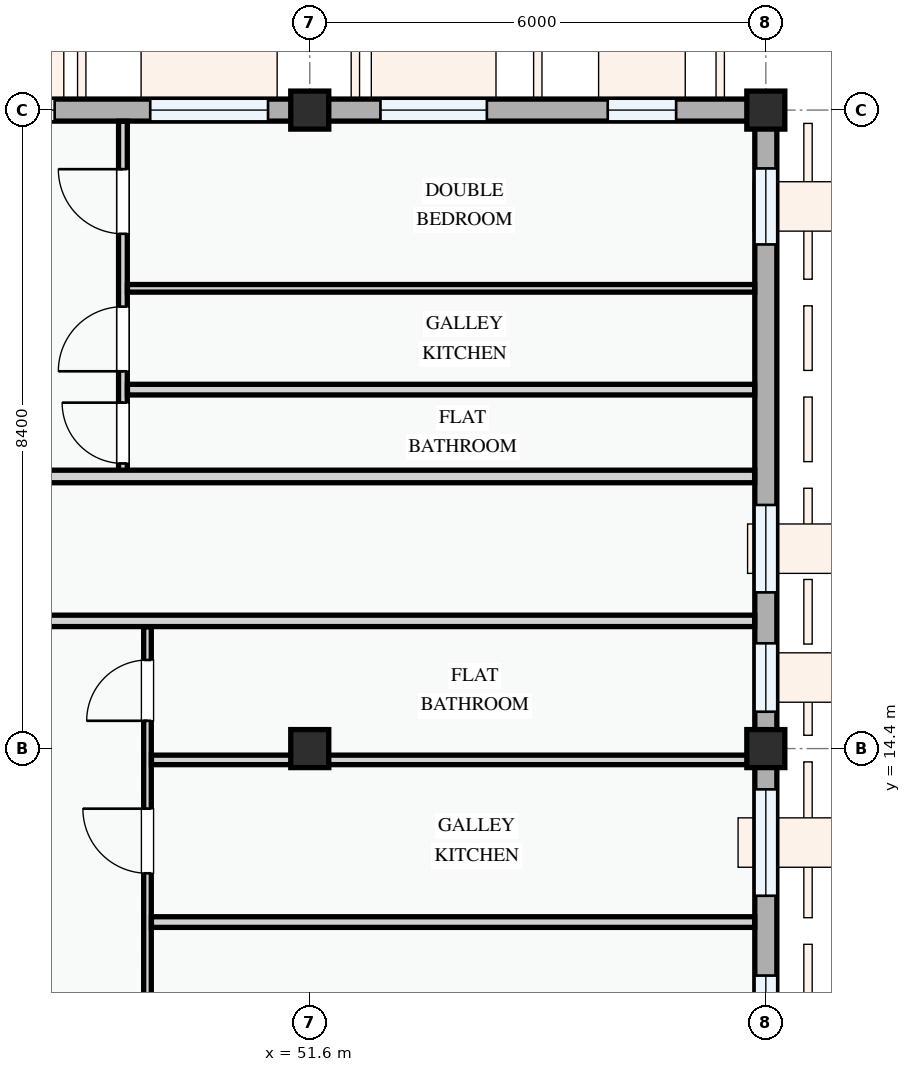
"""IFC4 building model, lengths in metres.
Left out: names, types, materials, properties, quantities, classifications, styles, units other than length and angle.
Written with IfcOpenShell. Run it as: python <this file> out.ifc"""

import sys

from ifc_helpers import new_model, si_unit, direction, frame, frame_2d, origin, origin_2d, place, context, subcontext, project, spatial, rectangle, extrude, element, fill, save


model = new_model("IFC4")
c1 = context("Model", 3, precision=1e-05, world=origin(), true_north=direction((0.0, 1.0)))
c2 = subcontext(c1, "Body", "Model", "MODEL_VIEW")
j1 = project(units=[si_unit("LENGTHUNIT", "METRE"), si_unit("PLANEANGLEUNIT", "RADIAN")], contexts=[c1])
p1 = place(None, origin())
s1 = spatial("IfcSite", under=j1, at=p1, CompositionType="ELEMENT")
p2 = place(p1, origin())
s2 = spatial("IfcBuilding", under=s1, at=p2, CompositionType="ELEMENT")
p3 = place(p2, frame((0.0, 0.0, 21.3)))
s3 = spatial("IfcBuildingStorey", under=s2, at=p3, CompositionType="ELEMENT", Elevation=21.3)
for number, where, z_axis, x_axis in (
    (1, (51.6, 14.4, 0.0), (0.0, 0.0, 1.0), (1.0, 0.0, 0.0)),
    (2, (51.6, 22.8, 0.0), (0.0, 0.0, 1.0), (1.0, 0.0, 0.0)),
    (3, (57.6, 14.4, 0.0), (0.0, 0.0, 1.0), (1.0, 0.0, 0.0)),
    (4, (57.6, 22.8, 0.0), (0.0, 0.0, 1.0), (1.0, 0.0, 0.0)),
):
    element("IfcColumn", number, at=place(p3, frame(where, z_axis=z_axis, x_axis=x_axis)), inside=s3, PredefinedType="COLUMN", context=c2, shape_type="SweptSolid", body=[
        extrude(rectangle(XDim=0.5, YDim=0.5, at=origin_2d()), origin(), (0.0, 0.0, 1.0), 3.3),
    ])
p4 = place(p3, frame((57.6, 8.4, 0.0), z_axis=(0.0, 0.0, 1.0), x_axis=(0.0, 1.0, 0.0)))
e5 = element("IfcWall", 5, at=p4, inside=s3, PredefinedType="STANDARD", context=c2, shape_type="SweptSolid", body=[
    extrude(rectangle(XDim=6.0, YDim=0.29, at=frame_2d((3.0, 0.0))), origin(), (0.0, 0.0, 1.0), 2.575),
])
p5 = place(p4, frame((0.894, 0.0, 0.78)))
e6 = element("IfcOpeningElement", 6, at=p5, cuts=e5, PredefinedType="OPENING", context=c2, shape_type="SweptSolid", body=[
    extrude(rectangle(XDim=2.12, YDim=1.44, at=frame_2d((1.06, 0.72))), frame((0.0, 0.155, 0.0), z_axis=(0.0, -1.0, 0.0), x_axis=(1.0, 0.0, 0.0)), (0.0, 0.0, 1.0), 0.31),
])
p6 = place(p4, frame((4.064, 0.0, 0.78)))
e7 = element("IfcOpeningElement", 7, at=p6, cuts=e5, PredefinedType="OPENING", context=c2, shape_type="SweptSolid", body=[
    extrude(rectangle(XDim=1.4, YDim=1.45, at=frame_2d((0.7, 0.725))), frame((0.0, 0.155, 0.0), z_axis=(0.0, -1.0, 0.0), x_axis=(1.0, 0.0, 0.0)), (0.0, 0.0, 1.0), 0.31),
])
p7 = place(p3, frame((57.6, 14.4, 0.0), z_axis=(0.0, 0.0, 1.0), x_axis=(0.0, 1.0, 0.0)))
e8 = element("IfcWall", 8, at=p7, inside=s3, PredefinedType="STANDARD", context=c2, shape_type="SweptSolid", body=[
    extrude(rectangle(XDim=8.4, YDim=0.29, at=frame_2d((4.2, 0.0))), origin(), (0.0, 0.0, 1.0), 2.425),
])
p8 = place(p7, frame((0.485, 0.0, 0.78)))
e9 = element("IfcOpeningElement", 9, at=p8, cuts=e8, PredefinedType="OPENING", context=c2, shape_type="SweptSolid", body=[
    extrude(rectangle(XDim=0.9, YDim=1.2, at=frame_2d((0.45, 0.6))), frame((0.0, 0.155, 0.0), z_axis=(0.0, -1.0, 0.0), x_axis=(1.0, 0.0, 0.0)), (0.0, 0.0, 1.0), 0.31),
])
p9 = place(p7, frame((2.055, 0.0, 0.78)))
e10 = element("IfcOpeningElement", 10, at=p9, cuts=e8, PredefinedType="OPENING", context=c2, shape_type="SweptSolid", body=[
    extrude(rectangle(XDim=1.15, YDim=1.25, at=frame_2d((0.575, 0.625))), frame((0.0, 0.155, 0.0), z_axis=(0.0, -1.0, 0.0), x_axis=(1.0, 0.0, 0.0)), (0.0, 0.0, 1.0), 0.31),
])
p10 = place(p7, frame((6.633, 0.0, 0.78)))
e11 = element("IfcOpeningElement", 11, at=p10, cuts=e8, PredefinedType="OPENING", context=c2, shape_type="SweptSolid", body=[
    extrude(rectangle(XDim=1.0, YDim=1.25, at=frame_2d((0.5, 0.625))), frame((0.0, 0.155, 0.0), z_axis=(0.0, -1.0, 0.0), x_axis=(1.0, 0.0, 0.0)), (0.0, 0.0, 1.0), 0.31),
])
p11 = place(p3, frame((57.6, 22.8, 0.0), z_axis=(0.0, 0.0, 1.0), x_axis=(-1.0, 0.0, 0.0)))
e12 = element("IfcWall", 12, at=p11, inside=s3, PredefinedType="STANDARD", context=c2, shape_type="SweptSolid", body=[
    extrude(rectangle(XDim=6.0, YDim=0.29, at=frame_2d((3.0, 0.0))), origin(), (0.0, 0.0, 1.0), 2.475),
])
p12 = place(p11, frame((1.18, 0.0, 0.78)))
e13 = element("IfcOpeningElement", 13, at=p12, cuts=e12, PredefinedType="OPENING", context=c2, shape_type="SweptSolid", body=[
    extrude(rectangle(XDim=0.9, YDim=1.2, at=frame_2d((0.45, 0.6))), frame((0.0, 0.155, 0.0), z_axis=(0.0, -1.0, 0.0), x_axis=(1.0, 0.0, 0.0)), (0.0, 0.0, 1.0), 0.31),
])
p13 = place(p11, frame((3.67, 0.0, 0.78)))
e14 = element("IfcOpeningElement", 14, at=p13, cuts=e12, PredefinedType="OPENING", context=c2, shape_type="SweptSolid", body=[
    extrude(rectangle(XDim=1.4, YDim=1.45, at=frame_2d((0.7, 0.725))), frame((0.0, 0.155, 0.0), z_axis=(0.0, -1.0, 0.0), x_axis=(1.0, 0.0, 0.0)), (0.0, 0.0, 1.0), 0.31),
])
p14 = place(p3, frame((51.6, 22.8, 0.0), z_axis=(0.0, 0.0, 1.0), x_axis=(-1.0, 0.0, 0.0)))
e15 = element("IfcWall", 15, at=p14, inside=s3, PredefinedType="STANDARD", context=c2, shape_type="SweptSolid", body=[
    extrude(rectangle(XDim=8.4, YDim=0.29, at=frame_2d((4.2, 0.0))), origin(), (0.0, 0.0, 1.0), 2.375),
])
p15 = place(p14, frame((0.549, 0.0, 0.78)))
e16 = element("IfcOpeningElement", 16, at=p15, cuts=e15, PredefinedType="OPENING", context=c2, shape_type="SweptSolid", body=[
    extrude(rectangle(XDim=1.55, YDim=1.4, at=frame_2d((0.775, 0.7))), frame((0.0, 0.155, 0.0), z_axis=(0.0, -1.0, 0.0), x_axis=(1.0, 0.0, 0.0)), (0.0, 0.0, 1.0), 0.31),
])
p16 = place(p14, frame((3.356, 0.0, 0.78)))
e17 = element("IfcOpeningElement", 17, at=p16, cuts=e15, PredefinedType="OPENING", context=c2, shape_type="SweptSolid", body=[
    extrude(rectangle(XDim=1.15, YDim=1.25, at=frame_2d((0.575, 0.625))), frame((0.0, 0.155, 0.0), z_axis=(0.0, -1.0, 0.0), x_axis=(1.0, 0.0, 0.0)), (0.0, 0.0, 1.0), 0.31),
])
p17 = place(p14, frame((5.947, 0.0, 0.78)))
e18 = element("IfcOpeningElement", 18, at=p17, cuts=e15, PredefinedType="OPENING", context=c2, shape_type="SweptSolid", body=[
    extrude(rectangle(XDim=1.58, YDim=1.48, at=frame_2d((0.79, 0.74))), frame((0.0, 0.155, 0.0), z_axis=(0.0, -1.0, 0.0), x_axis=(1.0, 0.0, 0.0)), (0.0, 0.0, 1.0), 0.31),
])
p18 = place(p3, frame((49.465, 8.547, 0.0), z_axis=(0.0, 0.0, 1.0), x_axis=(0.0, 1.0, 0.0)))
e19 = element("IfcWall", 19, at=p18, inside=s3, PredefinedType="PARTITIONING", context=c2, shape_type="SweptSolid", body=[
    extrude(rectangle(XDim=7.456, YDim=0.1, at=frame_2d((3.728, 0.0))), origin(), (0.0, 0.0, 1.0), 3.0),
])
p19 = place(p18, frame((1.317, 0.0, 0.0)))
e20 = element("IfcOpeningElement", 20, at=p19, cuts=e19, PredefinedType="OPENING", context=c2, shape_type="SweptSolid", body=[
    extrude(rectangle(XDim=0.85, YDim=2.1, at=frame_2d((0.425, 1.05))), frame((0.0, 0.06, 0.0), z_axis=(0.0, -1.0, 0.0), x_axis=(1.0, 0.0, 0.0)), (0.0, 0.0, 1.0), 0.12),
])
p20 = place(p18, frame((4.212, 0.0, 0.0)))
e21 = element("IfcOpeningElement", 21, at=p20, cuts=e19, PredefinedType="OPENING", context=c2, shape_type="SweptSolid", body=[
    extrude(rectangle(XDim=0.85, YDim=2.1, at=frame_2d((0.425, 1.05))), frame((0.0, 0.06, 0.0), z_axis=(0.0, -1.0, 0.0), x_axis=(1.0, 0.0, 0.0)), (0.0, 0.0, 1.0), 0.12),
])
p21 = place(p18, frame((6.219, 0.0, 0.0)))
e22 = element("IfcOpeningElement", 22, at=p21, cuts=e19, PredefinedType="OPENING", context=c2, shape_type="SweptSolid", body=[
    extrude(rectangle(XDim=0.8, YDim=2.1, at=frame_2d((0.4, 1.05))), frame((0.0, 0.06, 0.0), z_axis=(0.0, -1.0, 0.0), x_axis=(1.0, 0.0, 0.0)), (0.0, 0.0, 1.0), 0.12),
])
p22 = place(p3, frame((49.517, 12.118, 0.0), z_axis=(0.0, 0.0, 1.0), x_axis=(1.0, 0.0, 0.0)))
e23 = element("IfcWall", 23, at=p22, inside=s3, PredefinedType="PARTITIONING", context=c2, shape_type="SweptSolid", body=[
    extrude(rectangle(XDim=7.936, YDim=0.14, at=frame_2d((3.968, 0.0))), origin(), (0.0, 0.0, 1.0), 3.0),
])
p23 = place(p3, frame((49.517, 14.251, 0.0), z_axis=(0.0, 0.0, 1.0), x_axis=(1.0, 0.0, 0.0)))
e24 = element("IfcWall", 24, at=p23, inside=s3, PredefinedType="PARTITIONING", context=c2, shape_type="SweptSolid", body=[
    extrude(rectangle(XDim=7.936, YDim=0.125, at=frame_2d((3.968, 0.0))), origin(), (0.0, 0.0, 1.0), 2.375),
])
p24 = place(p3, frame((49.142, 17.98, 0.0), z_axis=(0.0, 0.0, 1.0), x_axis=(0.0, 1.0, 0.0)))
e25 = element("IfcWall", 25, at=p24, inside=s3, PredefinedType="PARTITIONING", context=c2, shape_type="SweptSolid", body=[
    extrude(rectangle(XDim=4.673, YDim=0.115, at=frame_2d((2.336, 0.0))), origin(), (0.0, 0.0, 1.0), 3.0),
])
p25 = place(p24, frame((0.171, 0.0, 0.0)))
e26 = element("IfcOpeningElement", 26, at=p25, cuts=e25, PredefinedType="OPENING", context=c2, shape_type="SweptSolid", body=[
    extrude(rectangle(XDim=0.8, YDim=2.1, at=frame_2d((0.4, 1.05))), frame((0.0, 0.067, 0.0), z_axis=(0.0, -1.0, 0.0), x_axis=(1.0, 0.0, 0.0)), (0.0, 0.0, 1.0), 0.135),
])
p26 = place(p24, frame((1.384, 0.0, 0.0)))
e27 = element("IfcOpeningElement", 27, at=p26, cuts=e25, PredefinedType="OPENING", context=c2, shape_type="SweptSolid", body=[
    extrude(rectangle(XDim=0.85, YDim=2.1, at=frame_2d((0.425, 1.05))), frame((0.0, 0.067, 0.0), z_axis=(0.0, -1.0, 0.0), x_axis=(1.0, 0.0, 0.0)), (0.0, 0.0, 1.0), 0.135),
])
p27 = place(p24, frame((3.193, 0.0, 0.0)))
e28 = element("IfcOpeningElement", 28, at=p27, cuts=e25, PredefinedType="OPENING", context=c2, shape_type="SweptSolid", body=[
    extrude(rectangle(XDim=0.85, YDim=2.1, at=frame_2d((0.425, 1.05))), frame((0.0, 0.067, 0.0), z_axis=(0.0, -1.0, 0.0), x_axis=(1.0, 0.0, 0.0)), (0.0, 0.0, 1.0), 0.135),
])
p28 = place(p3, frame((49.201, 20.455, 0.0), z_axis=(0.0, 0.0, 1.0), x_axis=(1.0, 0.0, 0.0)))
e29 = element("IfcWall", 29, at=p28, inside=s3, PredefinedType="PARTITIONING", context=c2, shape_type="SweptSolid", body=[
    extrude(rectangle(XDim=8.251, YDim=0.1, at=frame_2d((4.126, 0.0))), origin(), (0.0, 0.0, 1.0), 3.0),
])
p29 = place(p3, frame((49.201, 19.122, 0.0), z_axis=(0.0, 0.0, 1.0), x_axis=(1.0, 0.0, 0.0)))
e30 = element("IfcWall", 30, at=p29, inside=s3, PredefinedType="PARTITIONING", context=c2, shape_type="SweptSolid", body=[
    extrude(rectangle(XDim=8.251, YDim=0.14, at=frame_2d((4.126, 0.0))), origin(), (0.0, 0.0, 1.0), 3.0),
])
p30 = place(p3, frame((22.66, 16.08, 0.0), z_axis=(0.0, 0.0, 1.0), x_axis=(1.0, 0.0, 0.0)))
e31 = element("IfcWall", 31, at=p30, inside=s3, PredefinedType="PARTITIONING", context=c2, shape_type="SweptSolid", body=[
    extrude(rectangle(XDim=34.793, YDim=0.15, at=frame_2d((17.396, 0.0))), origin(), (0.0, 0.0, 1.0), 3.0),
])
p31 = place(p30, frame((2.627, 0.0, 0.0)))
e32 = element("IfcOpeningElement", 32, at=p31, cuts=e31, PredefinedType="OPENING", context=c2, shape_type="SweptSolid", body=[
    extrude(rectangle(XDim=0.92, YDim=2.1, at=frame_2d((0.46, 1.05))), frame((0.0, 0.085, 0.0), z_axis=(0.0, -1.0, 0.0), x_axis=(1.0, 0.0, 0.0)), (0.0, 0.0, 1.0), 0.17),
])
p32 = place(p30, frame((10.02, 0.0, 0.0)))
e33 = element("IfcOpeningElement", 33, at=p32, cuts=e31, PredefinedType="OPENING", context=c2, shape_type="SweptSolid", body=[
    extrude(rectangle(XDim=0.92, YDim=2.1, at=frame_2d((0.46, 1.05))), frame((0.0, 0.085, 0.0), z_axis=(0.0, -1.0, 0.0), x_axis=(1.0, 0.0, 0.0)), (0.0, 0.0, 1.0), 0.17),
])
p33 = place(p30, frame((24.355, 0.0, 0.0)))
e34 = element("IfcOpeningElement", 34, at=p33, cuts=e31, PredefinedType="OPENING", context=c2, shape_type="SweptSolid", body=[
    extrude(rectangle(XDim=0.92, YDim=2.1, at=frame_2d((0.46, 1.05))), frame((0.0, 0.085, 0.0), z_axis=(0.0, -1.0, 0.0), x_axis=(1.0, 0.0, 0.0)), (0.0, 0.0, 1.0), 0.17),
])
p34 = place(p3, frame((22.66, 17.98, 0.0), z_axis=(0.0, 0.0, 1.0), x_axis=(1.0, 0.0, 0.0)))
e35 = element("IfcWall", 35, at=p34, inside=s3, PredefinedType="PARTITIONING", context=c2, shape_type="SweptSolid", body=[
    extrude(rectangle(XDim=34.793, YDim=0.165, at=frame_2d((17.396, 0.0))), origin(), (0.0, 0.0, 1.0), 3.0),
])
p35 = place(p34, frame((2.63, 0.0, 0.0)))
e36 = element("IfcOpeningElement", 36, at=p35, cuts=e35, PredefinedType="OPENING", context=c2, shape_type="SweptSolid", body=[
    extrude(rectangle(XDim=0.92, YDim=2.1, at=frame_2d((0.46, 1.05))), frame((0.0, 0.093, 0.0), z_axis=(0.0, -1.0, 0.0), x_axis=(1.0, 0.0, 0.0)), (0.0, 0.0, 1.0), 0.185),
])
p36 = place(p34, frame((10.02, 0.0, 0.0)))
e37 = element("IfcOpeningElement", 37, at=p36, cuts=e35, PredefinedType="OPENING", context=c2, shape_type="SweptSolid", body=[
    extrude(rectangle(XDim=0.96, YDim=2.12, at=frame_2d((0.48, 1.06))), frame((0.0, 0.093, 0.0), z_axis=(0.0, -1.0, 0.0), x_axis=(1.0, 0.0, 0.0)), (0.0, 0.0, 1.0), 0.185),
])
p37 = place(p34, frame((24.289, 0.0, 0.0)))
e38 = element("IfcOpeningElement", 38, at=p37, cuts=e35, PredefinedType="OPENING", context=c2, shape_type="SweptSolid", body=[
    extrude(rectangle(XDim=0.92, YDim=2.1, at=frame_2d((0.46, 1.05))), frame((0.0, 0.093, 0.0), z_axis=(0.0, -1.0, 0.0), x_axis=(1.0, 0.0, 0.0)), (0.0, 0.0, 1.0), 0.185),
])
p38 = place(p5, origin())
e39 = element("IfcWindow", 39, at=p38, inside=s3, PartitioningType="DOUBLE_PANEL_VERTICAL", PredefinedType="WINDOW", context=c2, shape_type="SweptSolid", body=[
    extrude(rectangle(XDim=2.12, YDim=1.44, at=frame_2d((1.06, 0.72))), frame((0.0, 0.03, 0.0), z_axis=(0.0, -1.0, 0.0), x_axis=(1.0, 0.0, 0.0)), (0.0, 0.0, 1.0), 0.06),
])
fill(e6, e39)
p39 = place(p6, origin())
e40 = element("IfcWindow", 40, at=p39, inside=s3, PartitioningType="SINGLE_PANEL", PredefinedType="WINDOW", context=c2, shape_type="SweptSolid", body=[
    extrude(rectangle(XDim=1.4, YDim=1.45, at=frame_2d((0.7, 0.725))), frame((0.0, 0.03, 0.0), z_axis=(0.0, -1.0, 0.0), x_axis=(1.0, 0.0, 0.0)), (0.0, 0.0, 1.0), 0.06),
])
fill(e7, e40)
p40 = place(p8, origin())
e41 = element("IfcWindow", 41, at=p40, inside=s3, PartitioningType="SINGLE_PANEL", PredefinedType="WINDOW", context=c2, shape_type="SweptSolid", body=[
    extrude(rectangle(XDim=0.9, YDim=1.2, at=frame_2d((0.45, 0.6))), frame((0.0, 0.03, 0.0), z_axis=(0.0, -1.0, 0.0), x_axis=(1.0, 0.0, 0.0)), (0.0, 0.0, 1.0), 0.06),
])
fill(e9, e41)
p41 = place(p9, origin())
e42 = element("IfcWindow", 42, at=p41, inside=s3, PartitioningType="SINGLE_PANEL", PredefinedType="WINDOW", context=c2, shape_type="SweptSolid", body=[
    extrude(rectangle(XDim=1.15, YDim=1.25, at=frame_2d((0.575, 0.625))), frame((0.0, 0.03, 0.0), z_axis=(0.0, -1.0, 0.0), x_axis=(1.0, 0.0, 0.0)), (0.0, 0.0, 1.0), 0.06),
])
fill(e10, e42)
p42 = place(p10, origin())
e43 = element("IfcWindow", 43, at=p42, inside=s3, PartitioningType="SINGLE_PANEL", PredefinedType="WINDOW", context=c2, shape_type="SweptSolid", body=[
    extrude(rectangle(XDim=1.0, YDim=1.25, at=frame_2d((0.5, 0.625))), frame((0.0, 0.03, 0.0), z_axis=(0.0, -1.0, 0.0), x_axis=(1.0, 0.0, 0.0)), (0.0, 0.0, 1.0), 0.06),
])
fill(e11, e43)
p43 = place(p12, origin())
e44 = element("IfcWindow", 44, at=p43, inside=s3, PartitioningType="SINGLE_PANEL", PredefinedType="WINDOW", context=c2, shape_type="SweptSolid", body=[
    extrude(rectangle(XDim=0.9, YDim=1.2, at=frame_2d((0.45, 0.6))), frame((0.0, 0.03, 0.0), z_axis=(0.0, -1.0, 0.0), x_axis=(1.0, 0.0, 0.0)), (0.0, 0.0, 1.0), 0.06),
])
fill(e13, e44)
p44 = place(p13, origin())
e45 = element("IfcWindow", 45, at=p44, inside=s3, PartitioningType="SINGLE_PANEL", PredefinedType="WINDOW", context=c2, shape_type="SweptSolid", body=[
    extrude(rectangle(XDim=1.4, YDim=1.45, at=frame_2d((0.7, 0.725))), frame((0.0, 0.03, 0.0), z_axis=(0.0, -1.0, 0.0), x_axis=(1.0, 0.0, 0.0)), (0.0, 0.0, 1.0), 0.06),
])
fill(e14, e45)
p45 = place(p15, origin())
e46 = element("IfcWindow", 46, at=p45, inside=s3, PartitioningType="SINGLE_PANEL", PredefinedType="WINDOW", context=c2, shape_type="SweptSolid", body=[
    extrude(rectangle(XDim=1.55, YDim=1.4, at=frame_2d((0.775, 0.7))), frame((0.0, 0.03, 0.0), z_axis=(0.0, -1.0, 0.0), x_axis=(1.0, 0.0, 0.0)), (0.0, 0.0, 1.0), 0.06),
])
fill(e16, e46)
p46 = place(p16, origin())
e47 = element("IfcWindow", 47, at=p46, inside=s3, PartitioningType="SINGLE_PANEL", PredefinedType="WINDOW", context=c2, shape_type="SweptSolid", body=[
    extrude(rectangle(XDim=1.15, YDim=1.25, at=frame_2d((0.575, 0.625))), frame((0.0, 0.03, 0.0), z_axis=(0.0, -1.0, 0.0), x_axis=(1.0, 0.0, 0.0)), (0.0, 0.0, 1.0), 0.06),
])
fill(e17, e47)
p47 = place(p20, origin())
e48 = element("IfcDoor", 48, at=p47, inside=s3, OperationType="SINGLE_SWING_RIGHT", PredefinedType="DOOR", context=c2, shape_type="SweptSolid", body=[
    extrude(rectangle(XDim=0.85, YDim=2.1, at=frame_2d((0.425, 1.05))), frame((0.0, 0.025, 0.0), z_axis=(0.0, -1.0, 0.0), x_axis=(1.0, 0.0, 0.0)), (0.0, 0.0, 1.0), 0.05),
])
fill(e21, e48)
p48 = place(p21, origin())
e49 = element("IfcDoor", 49, at=p48, inside=s3, OperationType="SINGLE_SWING_LEFT", PredefinedType="DOOR", context=c2, shape_type="SweptSolid", body=[
    extrude(rectangle(XDim=0.8, YDim=2.1, at=frame_2d((0.4, 1.05))), frame((0.0, 0.025, 0.0), z_axis=(0.0, -1.0, 0.0), x_axis=(1.0, 0.0, 0.0)), (0.0, 0.0, 1.0), 0.05),
])
fill(e22, e49)
p49 = place(p25, origin())
e50 = element("IfcDoor", 50, at=p49, inside=s3, OperationType="SINGLE_SWING_RIGHT", PredefinedType="DOOR", context=c2, shape_type="SweptSolid", body=[
    extrude(rectangle(XDim=0.8, YDim=2.1, at=frame_2d((0.4, 1.05))), frame((0.0, 0.025, 0.0), z_axis=(0.0, -1.0, 0.0), x_axis=(1.0, 0.0, 0.0)), (0.0, 0.0, 1.0), 0.05),
])
fill(e26, e50)
p50 = place(p26, origin())
e51 = element("IfcDoor", 51, at=p50, inside=s3, OperationType="SINGLE_SWING_LEFT", PredefinedType="DOOR", context=c2, shape_type="SweptSolid", body=[
    extrude(rectangle(XDim=0.85, YDim=2.1, at=frame_2d((0.425, 1.05))), frame((0.0, 0.025, 0.0), z_axis=(0.0, -1.0, 0.0), x_axis=(1.0, 0.0, 0.0)), (0.0, 0.0, 1.0), 0.05),
])
fill(e27, e51)
p51 = place(p27, origin())
e52 = element("IfcDoor", 52, at=p51, inside=s3, OperationType="SINGLE_SWING_RIGHT", PredefinedType="DOOR", context=c2, shape_type="SweptSolid", body=[
    extrude(rectangle(XDim=0.85, YDim=2.1, at=frame_2d((0.425, 1.05))), frame((0.0, 0.025, 0.0), z_axis=(0.0, -1.0, 0.0), x_axis=(1.0, 0.0, 0.0)), (0.0, 0.0, 1.0), 0.05),
])
fill(e28, e52)
save(model, sys.argv[1])
